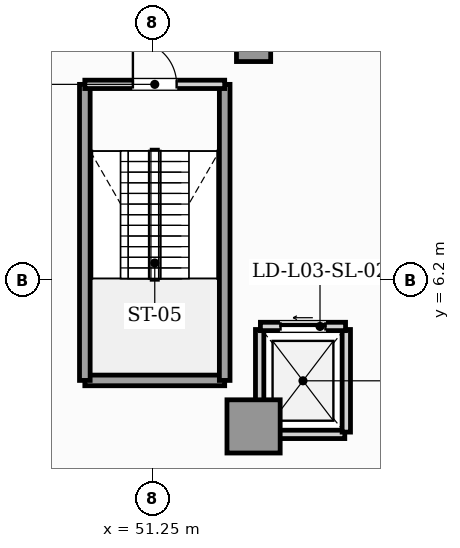
"""IFC4 building model, lengths in metres.
Left out: names, types, materials, properties, quantities, classifications, styles, units other than length and angle.
Written with IfcOpenShell. Run it as: python <this file> out.ifc"""

import sys

from ifc_helpers import new_model, si_unit, direction, frame, frame_2d, origin, origin_2d, place, context, subcontext, project, spatial, rectangle, hollow_rectangle, extrude, element, fill, save


model = new_model("IFC4")
c1 = context("Model", 3, precision=1e-05, world=origin(), true_north=direction((0.0, 1.0)))
c2 = subcontext(c1, "Body", "Model", "MODEL_VIEW")
j1 = project(units=[si_unit("LENGTHUNIT", "METRE"), si_unit("PLANEANGLEUNIT", "RADIAN")], contexts=[c1])
p1 = place(None, origin())
s1 = spatial("IfcSite", under=j1, at=p1, CompositionType="ELEMENT")
p2 = place(p1, origin())
s2 = spatial("IfcBuilding", under=s1, at=p2, CompositionType="ELEMENT")
p3 = place(p2, frame((0.0, 0.0, 15.0)))
s3 = spatial("IfcBuildingStorey", under=s2, at=p3, CompositionType="ELEMENT", Elevation=15.0)
p4 = place(p3, frame((53.9, 2.35, 0.0), z_axis=(0.0, 0.0, 1.0), x_axis=(1.0, 0.0, 0.0)))
e1 = element("IfcColumn", 1, at=p4, inside=s3, PredefinedType="USERDEFINED", context=c2, shape_type="SweptSolid", body=[
    extrude(hollow_rectangle(XDim=1.4, YDim=1.4, WallThickness=0.08, at=origin_2d()), origin(), (0.0, 0.0, 1.0), 4.8),
])
p5 = place(p3, frame((53.9, 12.4, 0.0), z_axis=(0.0, 0.0, 1.0), x_axis=(1.0, 0.0, 0.0)))
e2 = element("IfcColumn", 2, at=p5, inside=s3, PredefinedType="COLUMN", context=c2, shape_type="SweptSolid", body=[
    extrude(rectangle(XDim=0.9, YDim=0.9, at=origin_2d()), origin(), (0.0, 0.0, 1.0), 4.8),
])
p6 = place(p3, frame((54.1, 2.14, 0.0), z_axis=(0.0, 0.0, 1.0), x_axis=(1.0, 0.0, 0.0)))
e3 = element("IfcWall", 3, at=p6, inside=s3, PredefinedType="SOLIDWALL", context=c2, shape_type="SweptSolid", body=[
    extrude(rectangle(XDim=2.2, YDim=0.22, at=frame_2d((1.1, 0.0))), origin(), (0.0, 0.0, 1.0), 4.5),
])
p7 = place(p3, frame((54.06, 2.2, 0.0), z_axis=(0.0, 0.0, 1.0), x_axis=(0.0, 1.0, 0.0)))
e4 = element("IfcWall", 4, at=p7, inside=s3, PredefinedType="SOLIDWALL", context=c2, shape_type="SweptSolid", body=[
    extrude(rectangle(XDim=2.7, YDim=0.22, at=frame_2d((1.35, 0.0))), origin(), (0.0, 0.0, 1.0), 3.967),
])
p8 = place(p3, frame((56.34, 2.2, 0.0), z_axis=(0.0, 0.0, 1.0), x_axis=(0.0, 1.0, 0.0)))
e5 = element("IfcWall", 5, at=p8, inside=s3, PredefinedType="SOLIDWALL", context=c2, shape_type="SweptSolid", body=[
    extrude(rectangle(XDim=2.7, YDim=0.22, at=frame_2d((1.35, 0.0))), origin(), (0.0, 0.0, 1.0), 4.5),
])
p9 = place(p3, frame((54.08, 4.98, 0.0), z_axis=(0.0, 0.0, 1.0), x_axis=(1.0, 0.0, 0.0)))
e6 = element("IfcWall", 6, at=p9, inside=s3, PredefinedType="SOLIDWALL", context=c2, shape_type="SweptSolid", body=[
    extrude(rectangle(XDim=2.24, YDim=0.22, at=frame_2d((1.12, 0.0))), origin(), (0.0, 0.0, 1.0), 4.5),
])
p10 = place(p9, frame((0.53, 0.0, 0.0)))
e7 = element("IfcOpeningElement", 7, at=p10, cuts=e6, PredefinedType="OPENING", context=c2, shape_type="SweptSolid", body=[
    extrude(rectangle(XDim=1.18, YDim=2.2, at=frame_2d((0.59, 1.1))), frame((0.0, 0.12, 0.0), z_axis=(0.0, -1.0, 0.0), x_axis=(1.0, 0.0, 0.0)), (0.0, 0.0, 1.0), 0.24),
])
p11 = place(p3, frame((49.46, 3.56, 0.0), z_axis=(0.0, 0.0, 1.0), x_axis=(1.0, 0.0, 0.0)))
e8 = element("IfcWall", 8, at=p11, inside=s3, PredefinedType="SHEAR", context=c2, shape_type="SweptSolid", body=[
    extrude(rectangle(XDim=3.68, YDim=0.28, at=frame_2d((1.84, 0.0))), origin(), (0.0, 0.0, 1.0), 4.5),
])
for number, where, z_axis, x_axis in (
    (9, (49.46, 3.56, 0.0), (0.0, 0.0, 1.0), (0.0, 1.0, 0.0)),
    (10, (53.14, 3.56, 0.0), (0.0, 0.0, 1.0), (0.0, 1.0, 0.0)),
):
    element("IfcWall", number, at=place(p3, frame(where, z_axis=z_axis, x_axis=x_axis)), inside=s3, PredefinedType="SHEAR", context=c2, shape_type="SweptSolid", body=[
        extrude(rectangle(XDim=7.79, YDim=0.28, at=frame_2d((3.895, 0.0))), origin(), (0.0, 0.0, 1.0), 4.5),
    ])
p12 = place(p3, frame((49.46, 11.35, 0.0), z_axis=(0.0, 0.0, 1.0), x_axis=(1.0, 0.0, 0.0)))
e11 = element("IfcWall", 11, at=p12, inside=s3, PredefinedType="SOLIDWALL", context=c2, shape_type="SweptSolid", body=[
    extrude(rectangle(XDim=3.68, YDim=0.22, at=frame_2d((1.84, 0.0))), origin(), (0.0, 0.0, 1.0), 4.5),
])
p13 = place(p12, frame((1.265, 0.0, 0.0)))
e12 = element("IfcOpeningElement", 12, at=p13, cuts=e11, PredefinedType="OPENING", context=c2, shape_type="SweptSolid", body=[
    extrude(rectangle(XDim=1.15, YDim=2.2, at=frame_2d((0.575, 1.1))), frame((0.0, 0.12, 0.0), z_axis=(0.0, -1.0, 0.0), x_axis=(1.0, 0.0, 0.0)), (0.0, 0.0, 1.0), 0.24),
])
p14 = place(p10, origin())
e13 = element("IfcDoor", 13, at=p14, inside=s3, OperationType="SLIDING_TO_LEFT", PredefinedType="DOOR", context=c2, shape_type="SweptSolid", body=[
    extrude(rectangle(XDim=1.18, YDim=2.2, at=frame_2d((0.59, 1.1))), frame((0.0, 0.025, 0.0), z_axis=(0.0, -1.0, 0.0), x_axis=(1.0, 0.0, 0.0)), (0.0, 0.0, 1.0), 0.05),
])
fill(e7, e13)
p15 = place(p13, origin())
e14 = element("IfcDoor", 14, at=p15, inside=s3, OperationType="SINGLE_SWING_LEFT", PredefinedType="DOOR", context=c2, shape_type="SweptSolid", body=[
    extrude(rectangle(XDim=1.15, YDim=2.2, at=frame_2d((0.575, 1.1))), frame((0.0, 0.025, 0.0), z_axis=(0.0, -1.0, 0.0), x_axis=(1.0, 0.0, 0.0)), (0.0, 0.0, 1.0), 0.05),
])
fill(e12, e14)
save(model, sys.argv[1])
